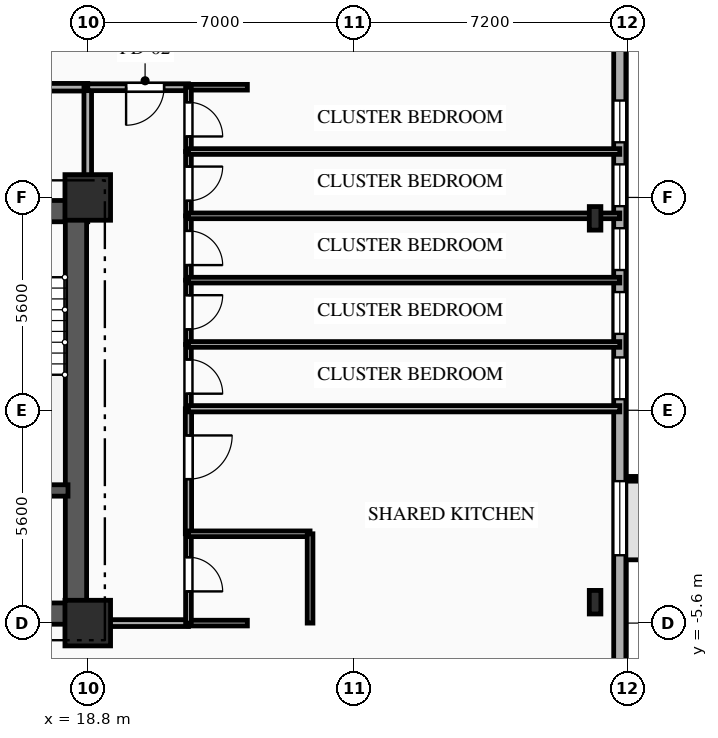
"""IFC4 building model, lengths in metres.
Left out: names, types, materials, properties, quantities, classifications, styles, units other than length and angle.
Written with IfcOpenShell. Run it as: python <this file> out.ifc"""

import sys

from ifc_helpers import new_model, si_unit, direction, frame, frame_2d, origin, origin_2d, place, context, subcontext, project, spatial, rectangle, i_section, extrude, element, fill, save


model = new_model("IFC4")
c1 = context("Model", 3, precision=1e-05, world=origin(), true_north=direction((0.0, 1.0)))
c2 = subcontext(c1, "Body", "Model", "MODEL_VIEW")
j1 = project(units=[si_unit("LENGTHUNIT", "METRE"), si_unit("PLANEANGLEUNIT", "RADIAN")], contexts=[c1])
p1 = place(None, origin())
s1 = spatial("IfcSite", under=j1, at=p1, CompositionType="ELEMENT")
p2 = place(p1, origin())
s2 = spatial("IfcBuilding", under=s1, at=p2, CompositionType="ELEMENT")
p3 = place(p2, frame((0.0, 0.0, 47.1)))
s3 = spatial("IfcBuildingStorey", under=s2, at=p3, CompositionType="ELEMENT", Elevation=47.1)
for number, where, z_axis, x_axis in (
    (1, (18.8, -5.6, 0.0), (0.0, 0.0, 1.0), (1.0, 0.0, 0.0)),
    (2, (18.8, 5.6, 0.0), (0.0, 0.0, 1.0), (1.0, 0.0, 0.0)),
):
    element("IfcColumn", number, at=place(p3, frame(where, z_axis=z_axis, x_axis=x_axis)), inside=s3, PredefinedType="COLUMN", context=c2, shape_type="SweptSolid", body=[
        extrude(rectangle(XDim=1.2, YDim=1.2, at=origin_2d()), origin(), (0.0, 0.0, 1.0), 3.35),
    ])
for number, where, z_axis, x_axis in (
    (3, (32.15, -5.05, 0.0), (0.0, 0.0, 1.0), (1.0, 0.0, 0.0)),
    (4, (32.15, 5.05, 0.0), (0.0, 0.0, 1.0), (1.0, 0.0, 0.0)),
):
    element("IfcColumn", number, at=place(p3, frame(where, z_axis=z_axis, x_axis=x_axis)), inside=s3, PredefinedType="COLUMN", context=c2, shape_type="SweptSolid", body=[
        extrude(i_section(OverallWidth=0.305, OverallDepth=0.62, WebThickness=0.021, FlangeThickness=0.04, FilletRadius=0.027, at=origin_2d()), origin(), (0.0, 0.0, 1.0), 3.35),
    ])
p4 = place(p3, frame((32.8, 15.8, 0.0), z_axis=(0.0, 0.0, 1.0), x_axis=(0.0, -1.0, 0.0)))
e5 = element("IfcWall", 5, at=p4, inside=s3, PredefinedType="SOLIDWALL", context=c2, shape_type="SweptSolid", body=[
    extrude(rectangle(XDim=31.6, YDim=0.32, at=frame_2d((15.8, 0.0))), origin(), (0.0, 0.0, 1.0), 3.035),
])
p5 = place(p4, frame((7.65, 0.0, 0.85)))
e6 = element("IfcOpeningElement", 6, at=p5, cuts=e5, PredefinedType="OPENING", context=c2, shape_type="SweptSolid", body=[
    extrude(rectangle(XDim=1.1, YDim=1.85, at=frame_2d((0.55, 0.925))), frame((0.0, 0.17, 0.0), z_axis=(0.0, -1.0, 0.0), x_axis=(1.0, 0.0, 0.0)), (0.0, 0.0, 1.0), 0.34),
])
p6 = place(p4, frame((9.33, 0.0, 0.85)))
e7 = element("IfcOpeningElement", 7, at=p6, cuts=e5, PredefinedType="OPENING", context=c2, shape_type="SweptSolid", body=[
    extrude(rectangle(XDim=1.1, YDim=1.85, at=frame_2d((0.55, 0.925))), frame((0.0, 0.17, 0.0), z_axis=(0.0, -1.0, 0.0), x_axis=(1.0, 0.0, 0.0)), (0.0, 0.0, 1.0), 0.34),
])
p7 = place(p4, frame((11.01, 0.0, 0.85)))
e8 = element("IfcOpeningElement", 8, at=p7, cuts=e5, PredefinedType="OPENING", context=c2, shape_type="SweptSolid", body=[
    extrude(rectangle(XDim=1.1, YDim=1.85, at=frame_2d((0.55, 0.925))), frame((0.0, 0.17, 0.0), z_axis=(0.0, -1.0, 0.0), x_axis=(1.0, 0.0, 0.0)), (0.0, 0.0, 1.0), 0.34),
])
p8 = place(p4, frame((12.69, 0.0, 0.85)))
e9 = element("IfcOpeningElement", 9, at=p8, cuts=e5, PredefinedType="OPENING", context=c2, shape_type="SweptSolid", body=[
    extrude(rectangle(XDim=1.1, YDim=1.85, at=frame_2d((0.55, 0.925))), frame((0.0, 0.17, 0.0), z_axis=(0.0, -1.0, 0.0), x_axis=(1.0, 0.0, 0.0)), (0.0, 0.0, 1.0), 0.34),
])
p9 = place(p4, frame((14.41, 0.0, 0.85)))
e10 = element("IfcOpeningElement", 10, at=p9, cuts=e5, PredefinedType="OPENING", context=c2, shape_type="SweptSolid", body=[
    extrude(rectangle(XDim=1.1, YDim=1.85, at=frame_2d((0.55, 0.925))), frame((0.0, 0.17, 0.0), z_axis=(0.0, -1.0, 0.0), x_axis=(1.0, 0.0, 0.0)), (0.0, 0.0, 1.0), 0.34),
])
p10 = place(p4, frame((17.665, 0.0, 0.85)))
e11 = element("IfcOpeningElement", 11, at=p10, cuts=e5, PredefinedType="OPENING", context=c2, shape_type="SweptSolid", body=[
    extrude(rectangle(XDim=1.95, YDim=1.85, at=frame_2d((0.975, 0.925))), frame((0.0, 0.17, 0.0), z_axis=(0.0, -1.0, 0.0), x_axis=(1.0, 0.0, 0.0)), (0.0, 0.0, 1.0), 0.34),
])
p11 = place(p3, frame((9.2, 5.24, 0.0), z_axis=(0.0, 0.0, 1.0), x_axis=(1.0, 0.0, 0.0)))
e12 = element("IfcWall", 12, at=p11, inside=s3, PredefinedType="SHEAR", context=c2, shape_type="SweptSolid", body=[
    extrude(rectangle(XDim=9.6, YDim=0.56, at=frame_2d((4.8, 0.0))), origin(), (0.0, 0.0, 1.0), 3.035),
])
p12 = place(p11, frame((6.95, 0.0, 0.0)))
e13 = element("IfcOpeningElement", 13, at=p12, cuts=e12, PredefinedType="OPENING", context=c2, shape_type="SweptSolid", body=[
    extrude(rectangle(XDim=1.1, YDim=2.15, at=frame_2d((0.55, 1.075))), frame((0.0, 0.29, 0.0), z_axis=(0.0, -1.0, 0.0), x_axis=(1.0, 0.0, 0.0)), (0.0, 0.0, 1.0), 0.58),
])
p13 = place(p11, frame((3.775, 0.0, 0.0)))
e14 = element("IfcOpeningElement", 14, at=p13, cuts=e12, PredefinedType="OPENING", context=c2, shape_type="SweptSolid", body=[
    extrude(rectangle(XDim=1.05, YDim=2.1, at=frame_2d((0.525, 1.05))), frame((0.0, 0.29, 0.0), z_axis=(0.0, -1.0, 0.0), x_axis=(1.0, 0.0, 0.0)), (0.0, 0.0, 1.0), 0.58),
])
p14 = place(p3, frame((9.2, -5.35, 0.0), z_axis=(0.0, 0.0, 1.0), x_axis=(1.0, 0.0, 0.0)))
e15 = element("IfcWall", 15, at=p14, inside=s3, PredefinedType="SHEAR", context=c2, shape_type="SweptSolid", body=[
    extrude(rectangle(XDim=9.6, YDim=0.56, at=frame_2d((4.8, 0.0))), origin(), (0.0, 0.0, 1.0), 3.035),
])
p15 = place(p14, frame((7.65, 0.0, 0.0)))
e16 = element("IfcOpeningElement", 16, at=p15, cuts=e15, PredefinedType="OPENING", context=c2, shape_type="SweptSolid", body=[
    extrude(rectangle(XDim=0.9, YDim=2.1, at=frame_2d((0.45, 1.05))), frame((0.0, 0.29, 0.0), z_axis=(0.0, -1.0, 0.0), x_axis=(1.0, 0.0, 0.0)), (0.0, 0.0, 1.0), 0.58),
])
p16 = place(p3, frame((18.49, -5.05, 0.0), z_axis=(0.0, 0.0, 1.0), x_axis=(0.0, 1.0, 0.0)))
e17 = element("IfcWall", 17, at=p16, inside=s3, PredefinedType="SHEAR", context=c2, shape_type="SweptSolid", body=[
    extrude(rectangle(XDim=10.1, YDim=0.56, at=frame_2d((5.05, 0.0))), origin(), (0.0, 0.0, 1.0), 3.035),
])
p17 = place(p3, frame((15.1, -2.11, 0.0), z_axis=(0.0, 0.0, 1.0), x_axis=(1.0, 0.0, 0.0)))
e18 = element("IfcWall", 18, at=p17, inside=s3, PredefinedType="SHEAR", context=c2, shape_type="SweptSolid", body=[
    extrude(rectangle(XDim=3.18, YDim=0.3, at=frame_2d((1.59, 0.0))), origin(), (0.0, 0.0, 1.0), 3.035),
])
p18 = place(p3, frame((18.8, 8.5, 0.0), z_axis=(0.0, 0.0, 1.0), x_axis=(-1.0, 0.0, 0.0)))
e19 = element("IfcWall", 19, at=p18, inside=s3, PredefinedType="PARTITIONING", context=c2, shape_type="SweptSolid", body=[
    extrude(rectangle(XDim=6.8, YDim=0.2, at=frame_2d((3.4, 0.0))), origin(), (0.0, 0.0, 1.0), 3.035),
])
p19 = place(p18, frame((3.985, 0.0, 0.0)))
e20 = element("IfcOpeningElement", 20, at=p19, cuts=e19, PredefinedType="OPENING", context=c2, shape_type="SweptSolid", body=[
    extrude(rectangle(XDim=1.1, YDim=2.15, at=frame_2d((0.55, 1.075))), frame((0.0, 0.11, 0.0), z_axis=(0.0, -1.0, 0.0), x_axis=(1.0, 0.0, 0.0)), (0.0, 0.0, 1.0), 0.22),
])
p20 = place(p3, frame((18.8, 5.6, 0.0), z_axis=(0.0, 0.0, 1.0), x_axis=(0.0, 1.0, 0.0)))
e21 = element("IfcWall", 21, at=p20, inside=s3, PredefinedType="PARTITIONING", context=c2, shape_type="SweptSolid", body=[
    extrude(rectangle(XDim=2.9, YDim=0.2, at=frame_2d((1.45, 0.0))), origin(), (0.0, 0.0, 1.0), 2.52),
])
p21 = place(p3, frame((21.45, 8.5, 0.0), z_axis=(0.0, 0.0, 1.0), x_axis=(-1.0, 0.0, 0.0)))
e22 = element("IfcWall", 22, at=p21, inside=s3, PredefinedType="PARTITIONING", context=c2, shape_type="SweptSolid", body=[
    extrude(rectangle(XDim=2.65, YDim=0.18, at=frame_2d((1.325, 0.0))), origin(), (0.0, 0.0, 1.0), 3.035),
])
p22 = place(p21, frame((0.641, 0.0, 0.0)))
e23 = element("IfcOpeningElement", 23, at=p22, cuts=e22, PredefinedType="OPENING", context=c2, shape_type="SweptSolid", body=[
    extrude(rectangle(XDim=1.0, YDim=2.15, at=frame_2d((0.5, 1.075))), frame((0.0, 0.1, 0.0), z_axis=(0.0, -1.0, 0.0), x_axis=(1.0, 0.0, 0.0)), (0.0, 0.0, 1.0), 0.2),
])
p23 = place(p3, frame((23.0, 8.5, 0.0), z_axis=(0.0, 0.0, 1.0), x_axis=(-1.0, 0.0, 0.0)))
e24 = element("IfcWall", 24, at=p23, inside=s3, PredefinedType="PARTITIONING", context=c2, shape_type="SweptSolid", body=[
    extrude(rectangle(XDim=1.55, YDim=0.15, at=frame_2d((0.775, 0.0))), origin(), (0.0, 0.0, 1.0), 3.035),
])
p24 = place(p3, frame((18.8, -5.6, 0.0), z_axis=(0.0, 0.0, 1.0), x_axis=(1.0, 0.0, 0.0)))
e25 = element("IfcWall", 25, at=p24, inside=s3, PredefinedType="PARTITIONING", context=c2, shape_type="SweptSolid", body=[
    extrude(rectangle(XDim=2.65, YDim=0.18, at=frame_2d((1.325, 0.0))), origin(), (0.0, 0.0, 1.0), 3.035),
])
p25 = place(p3, frame((21.45, -5.6, 0.0), z_axis=(0.0, 0.0, 1.0), x_axis=(1.0, 0.0, 0.0)))
e26 = element("IfcWall", 26, at=p25, inside=s3, PredefinedType="PLUMBINGWALL", context=c2, shape_type="SweptSolid", body=[
    extrude(rectangle(XDim=1.55, YDim=0.15, at=frame_2d((0.775, 0.0))), origin(), (0.0, 0.0, 1.0), 3.035),
])
p26 = place(p3, frame((21.45, -3.25, 0.0), z_axis=(0.0, 0.0, 1.0), x_axis=(0.0, -1.0, 0.0)))
e27 = element("IfcWall", 27, at=p26, inside=s3, PredefinedType="PLUMBINGWALL", context=c2, shape_type="SweptSolid", body=[
    extrude(rectangle(XDim=2.35, YDim=0.15, at=frame_2d((1.175, 0.0))), origin(), (0.0, 0.0, 1.0), 3.035),
])
p27 = place(p26, frame((0.616, 0.0, 0.0)))
e28 = element("IfcOpeningElement", 28, at=p27, cuts=e27, PredefinedType="OPENING", context=c2, shape_type="SweptSolid", body=[
    extrude(rectangle(XDim=0.9, YDim=2.1, at=frame_2d((0.45, 1.05))), frame((0.0, 0.085, 0.0), z_axis=(0.0, -1.0, 0.0), x_axis=(1.0, 0.0, 0.0)), (0.0, 0.0, 1.0), 0.17),
])
p28 = place(p3, frame((21.45, 0.04, 0.0), z_axis=(0.0, 0.0, 1.0), x_axis=(0.0, -1.0, 0.0)))
e29 = element("IfcWall", 29, at=p28, inside=s3, PredefinedType="PARTITIONING", context=c2, shape_type="SweptSolid", body=[
    extrude(rectangle(XDim=3.29, YDim=0.165, at=frame_2d((1.645, 0.0))), origin(), (0.0, 0.0, 1.0), 3.035),
])
p29 = place(p28, frame((0.702, 0.0, 0.0)))
e30 = element("IfcOpeningElement", 30, at=p29, cuts=e29, PredefinedType="OPENING", context=c2, shape_type="SweptSolid", body=[
    extrude(rectangle(XDim=1.15, YDim=2.15, at=frame_2d((0.575, 1.075))), frame((0.0, 0.093, 0.0), z_axis=(0.0, -1.0, 0.0), x_axis=(1.0, 0.0, 0.0)), (0.0, 0.0, 1.0), 0.185),
])
p30 = place(p3, frame((21.45, 1.732, 0.0), z_axis=(0.0, 0.0, 1.0), x_axis=(0.0, -1.0, 0.0)))
e31 = element("IfcWall", 31, at=p30, inside=s3, PredefinedType="PARTITIONING", context=c2, shape_type="SweptSolid", body=[
    extrude(rectangle(XDim=1.692, YDim=0.15, at=frame_2d((0.846, 0.0))), origin(), (0.0, 0.0, 1.0), 3.035),
])
p31 = place(p30, frame((0.396, 0.0, 0.0)))
e32 = element("IfcOpeningElement", 32, at=p31, cuts=e31, PredefinedType="OPENING", context=c2, shape_type="SweptSolid", body=[
    extrude(rectangle(XDim=0.9, YDim=2.1, at=frame_2d((0.45, 1.05))), frame((0.0, 0.085, 0.0), z_axis=(0.0, -1.0, 0.0), x_axis=(1.0, 0.0, 0.0)), (0.0, 0.0, 1.0), 0.17),
])
p32 = place(p3, frame((21.45, 3.424, 0.0), z_axis=(0.0, 0.0, 1.0), x_axis=(0.0, -1.0, 0.0)))
e33 = element("IfcWall", 33, at=p32, inside=s3, PredefinedType="PARTITIONING", context=c2, shape_type="SweptSolid", body=[
    extrude(rectangle(XDim=1.692, YDim=0.15, at=frame_2d((0.846, 0.0))), origin(), (0.0, 0.0, 1.0), 3.035),
])
p33 = place(p32, frame((0.396, 0.0, 0.0)))
e34 = element("IfcOpeningElement", 34, at=p33, cuts=e33, PredefinedType="OPENING", context=c2, shape_type="SweptSolid", body=[
    extrude(rectangle(XDim=0.9, YDim=2.1, at=frame_2d((0.45, 1.05))), frame((0.0, 0.085, 0.0), z_axis=(0.0, -1.0, 0.0), x_axis=(1.0, 0.0, 0.0)), (0.0, 0.0, 1.0), 0.17),
])
p34 = place(p3, frame((21.45, 5.116, 0.0), z_axis=(0.0, 0.0, 1.0), x_axis=(0.0, -1.0, 0.0)))
e35 = element("IfcWall", 35, at=p34, inside=s3, PredefinedType="PARTITIONING", context=c2, shape_type="SweptSolid", body=[
    extrude(rectangle(XDim=1.692, YDim=0.15, at=frame_2d((0.846, 0.0))), origin(), (0.0, 0.0, 1.0), 3.035),
])
p35 = place(p34, frame((0.396, 0.0, 0.0)))
e36 = element("IfcOpeningElement", 36, at=p35, cuts=e35, PredefinedType="OPENING", context=c2, shape_type="SweptSolid", body=[
    extrude(rectangle(XDim=0.9, YDim=2.1, at=frame_2d((0.45, 1.05))), frame((0.0, 0.085, 0.0), z_axis=(0.0, -1.0, 0.0), x_axis=(1.0, 0.0, 0.0)), (0.0, 0.0, 1.0), 0.17),
])
p36 = place(p3, frame((21.45, 6.808, 0.0), z_axis=(0.0, 0.0, 1.0), x_axis=(0.0, -1.0, 0.0)))
e37 = element("IfcWall", 37, at=p36, inside=s3, PredefinedType="PARTITIONING", context=c2, shape_type="SweptSolid", body=[
    extrude(rectangle(XDim=1.692, YDim=0.15, at=frame_2d((0.846, 0.0))), origin(), (0.0, 0.0, 1.0), 3.035),
])
p37 = place(p36, frame((0.396, 0.0, 0.0)))
e38 = element("IfcOpeningElement", 38, at=p37, cuts=e37, PredefinedType="OPENING", context=c2, shape_type="SweptSolid", body=[
    extrude(rectangle(XDim=0.9, YDim=2.1, at=frame_2d((0.45, 1.05))), frame((0.0, 0.085, 0.0), z_axis=(0.0, -1.0, 0.0), x_axis=(1.0, 0.0, 0.0)), (0.0, 0.0, 1.0), 0.17),
])
p38 = place(p3, frame((21.45, 8.5, 0.0), z_axis=(0.0, 0.0, 1.0), x_axis=(0.0, -1.0, 0.0)))
e39 = element("IfcWall", 39, at=p38, inside=s3, PredefinedType="PARTITIONING", context=c2, shape_type="SweptSolid", body=[
    extrude(rectangle(XDim=1.692, YDim=0.15, at=frame_2d((0.846, 0.0))), origin(), (0.0, 0.0, 1.0), 3.035),
])
p39 = place(p38, frame((0.396, 0.0, 0.0)))
e40 = element("IfcOpeningElement", 40, at=p39, cuts=e39, PredefinedType="OPENING", context=c2, shape_type="SweptSolid", body=[
    extrude(rectangle(XDim=0.9, YDim=2.1, at=frame_2d((0.45, 1.05))), frame((0.0, 0.085, 0.0), z_axis=(0.0, -1.0, 0.0), x_axis=(1.0, 0.0, 0.0)), (0.0, 0.0, 1.0), 0.17),
])
p40 = place(p3, frame((21.45, -3.25, 0.0), z_axis=(0.0, 0.0, 1.0), x_axis=(1.0, 0.0, 0.0)))
e41 = element("IfcWall", 41, at=p40, inside=s3, PredefinedType="PLUMBINGWALL", context=c2, shape_type="SweptSolid", body=[
    extrude(rectangle(XDim=3.2, YDim=0.15, at=frame_2d((1.6, 0.0))), origin(), (0.0, 0.0, 1.0), 2.52),
])
p41 = place(p3, frame((24.65, -3.25, 0.0), z_axis=(0.0, 0.0, 1.0), x_axis=(0.0, -1.0, 0.0)))
e42 = element("IfcWall", 42, at=p41, inside=s3, PredefinedType="PLUMBINGWALL", context=c2, shape_type="SweptSolid", body=[
    extrude(rectangle(XDim=2.35, YDim=0.15, at=frame_2d((1.175, 0.0))), origin(), (0.0, 0.0, 1.0), 3.035),
])
p42 = place(p3, frame((21.45, 0.04, 0.0), z_axis=(0.0, 0.0, 1.0), x_axis=(1.0, 0.0, 0.0)))
e43 = element("IfcWall", 43, at=p42, inside=s3, PredefinedType="PARTITIONING", context=c2, shape_type="SweptSolid", body=[
    extrude(rectangle(XDim=11.35, YDim=0.165, at=frame_2d((5.675, 0.0))), origin(), (0.0, 0.0, 1.0), 3.035),
])
p43 = place(p3, frame((21.45, 1.732, 0.0), z_axis=(0.0, 0.0, 1.0), x_axis=(1.0, 0.0, 0.0)))
e44 = element("IfcWall", 44, at=p43, inside=s3, PredefinedType="PARTITIONING", context=c2, shape_type="SweptSolid", body=[
    extrude(rectangle(XDim=11.35, YDim=0.15, at=frame_2d((5.675, 0.0))), origin(), (0.0, 0.0, 1.0), 3.035),
])
for number, where, z_axis, x_axis in (
    (45, (21.45, 3.424, 0.0), (0.0, 0.0, 1.0), (1.0, 0.0, 0.0)),
    (46, (21.45, 5.116, 0.0), (0.0, 0.0, 1.0), (1.0, 0.0, 0.0)),
):
    element("IfcWall", number, at=place(p3, frame(where, z_axis=z_axis, x_axis=x_axis)), inside=s3, PredefinedType="PARTITIONING", context=c2, shape_type="SweptSolid", body=[
        extrude(rectangle(XDim=11.35, YDim=0.15, at=frame_2d((5.675, 0.0))), origin(), (0.0, 0.0, 1.0), 2.52),
    ])
p44 = place(p3, frame((21.45, 6.808, 0.0), z_axis=(0.0, 0.0, 1.0), x_axis=(1.0, 0.0, 0.0)))
e47 = element("IfcWall", 47, at=p44, inside=s3, PredefinedType="PARTITIONING", context=c2, shape_type="SweptSolid", body=[
    extrude(rectangle(XDim=11.35, YDim=0.15, at=frame_2d((5.675, 0.0))), origin(), (0.0, 0.0, 1.0), 3.035),
])
p45 = place(p5, origin())
e48 = element("IfcWindow", 48, at=p45, inside=s3, PartitioningType="SINGLE_PANEL", PredefinedType="WINDOW", context=c2, shape_type="SweptSolid", body=[
    extrude(rectangle(XDim=1.1, YDim=1.85, at=frame_2d((0.55, 0.925))), frame((0.0, 0.03, 0.0), z_axis=(0.0, -1.0, 0.0), x_axis=(1.0, 0.0, 0.0)), (0.0, 0.0, 1.0), 0.06),
])
fill(e6, e48)
p46 = place(p6, origin())
e49 = element("IfcWindow", 49, at=p46, inside=s3, PartitioningType="SINGLE_PANEL", PredefinedType="WINDOW", context=c2, shape_type="SweptSolid", body=[
    extrude(rectangle(XDim=1.1, YDim=1.85, at=frame_2d((0.55, 0.925))), frame((0.0, 0.03, 0.0), z_axis=(0.0, -1.0, 0.0), x_axis=(1.0, 0.0, 0.0)), (0.0, 0.0, 1.0), 0.06),
])
fill(e7, e49)
p47 = place(p7, origin())
e50 = element("IfcWindow", 50, at=p47, inside=s3, PartitioningType="SINGLE_PANEL", PredefinedType="WINDOW", context=c2, shape_type="SweptSolid", body=[
    extrude(rectangle(XDim=1.1, YDim=1.85, at=frame_2d((0.55, 0.925))), frame((0.0, 0.03, 0.0), z_axis=(0.0, -1.0, 0.0), x_axis=(1.0, 0.0, 0.0)), (0.0, 0.0, 1.0), 0.06),
])
fill(e8, e50)
p48 = place(p8, origin())
e51 = element("IfcWindow", 51, at=p48, inside=s3, PartitioningType="SINGLE_PANEL", PredefinedType="WINDOW", context=c2, shape_type="SweptSolid", body=[
    extrude(rectangle(XDim=1.1, YDim=1.85, at=frame_2d((0.55, 0.925))), frame((0.0, 0.03, 0.0), z_axis=(0.0, -1.0, 0.0), x_axis=(1.0, 0.0, 0.0)), (0.0, 0.0, 1.0), 0.06),
])
fill(e9, e51)
p49 = place(p9, origin())
e52 = element("IfcWindow", 52, at=p49, inside=s3, PartitioningType="SINGLE_PANEL", PredefinedType="WINDOW", context=c2, shape_type="SweptSolid", body=[
    extrude(rectangle(XDim=1.1, YDim=1.85, at=frame_2d((0.55, 0.925))), frame((0.0, 0.03, 0.0), z_axis=(0.0, -1.0, 0.0), x_axis=(1.0, 0.0, 0.0)), (0.0, 0.0, 1.0), 0.06),
])
fill(e10, e52)
p50 = place(p10, origin())
e53 = element("IfcWindow", 53, at=p50, inside=s3, PartitioningType="SINGLE_PANEL", PredefinedType="WINDOW", context=c2, shape_type="SweptSolid", body=[
    extrude(rectangle(XDim=1.95, YDim=1.85, at=frame_2d((0.975, 0.925))), frame((0.0, 0.03, 0.0), z_axis=(0.0, -1.0, 0.0), x_axis=(1.0, 0.0, 0.0)), (0.0, 0.0, 1.0), 0.06),
])
fill(e11, e53)
p51 = place(p22, origin())
e54 = element("IfcDoor", 54, at=p51, inside=s3, OperationType="SINGLE_SWING_RIGHT", PredefinedType="DOOR", context=c2, shape_type="SweptSolid", body=[
    extrude(rectangle(XDim=1.0, YDim=2.15, at=frame_2d((0.5, 1.075))), frame((0.0, 0.025, 0.0), z_axis=(0.0, -1.0, 0.0), x_axis=(1.0, 0.0, 0.0)), (0.0, 0.0, 1.0), 0.05),
])
fill(e23, e54)
p52 = place(p27, origin())
e55 = element("IfcDoor", 55, at=p52, inside=s3, OperationType="SINGLE_SWING_RIGHT", PredefinedType="DOOR", context=c2, shape_type="SweptSolid", body=[
    extrude(rectangle(XDim=0.9, YDim=2.1, at=frame_2d((0.45, 1.05))), frame((0.0, 0.025, 0.0), z_axis=(0.0, -1.0, 0.0), x_axis=(1.0, 0.0, 0.0)), (0.0, 0.0, 1.0), 0.05),
])
fill(e28, e55)
p53 = place(p29, origin())
e56 = element("IfcDoor", 56, at=p53, inside=s3, OperationType="SINGLE_SWING_LEFT", PredefinedType="DOOR", context=c2, shape_type="SweptSolid", body=[
    extrude(rectangle(XDim=1.15, YDim=2.15, at=frame_2d((0.575, 1.075))), frame((0.0, 0.025, 0.0), z_axis=(0.0, -1.0, 0.0), x_axis=(1.0, 0.0, 0.0)), (0.0, 0.0, 1.0), 0.05),
])
fill(e30, e56)
p54 = place(p31, origin())
e57 = element("IfcDoor", 57, at=p54, inside=s3, OperationType="SINGLE_SWING_RIGHT", PredefinedType="DOOR", context=c2, shape_type="SweptSolid", body=[
    extrude(rectangle(XDim=0.9, YDim=2.1, at=frame_2d((0.45, 1.05))), frame((0.0, 0.025, 0.0), z_axis=(0.0, -1.0, 0.0), x_axis=(1.0, 0.0, 0.0)), (0.0, 0.0, 1.0), 0.05),
])
fill(e32, e57)
p55 = place(p33, origin())
e58 = element("IfcDoor", 58, at=p55, inside=s3, OperationType="SINGLE_SWING_LEFT", PredefinedType="DOOR", context=c2, shape_type="SweptSolid", body=[
    extrude(rectangle(XDim=0.9, YDim=2.1, at=frame_2d((0.45, 1.05))), frame((0.0, 0.025, 0.0), z_axis=(0.0, -1.0, 0.0), x_axis=(1.0, 0.0, 0.0)), (0.0, 0.0, 1.0), 0.05),
])
fill(e34, e58)
p56 = place(p35, origin())
e59 = element("IfcDoor", 59, at=p56, inside=s3, OperationType="SINGLE_SWING_RIGHT", PredefinedType="DOOR", context=c2, shape_type="SweptSolid", body=[
    extrude(rectangle(XDim=0.9, YDim=2.1, at=frame_2d((0.45, 1.05))), frame((0.0, 0.025, 0.0), z_axis=(0.0, -1.0, 0.0), x_axis=(1.0, 0.0, 0.0)), (0.0, 0.0, 1.0), 0.05),
])
fill(e36, e59)
p57 = place(p37, origin())
e60 = element("IfcDoor", 60, at=p57, inside=s3, OperationType="SINGLE_SWING_LEFT", PredefinedType="DOOR", context=c2, shape_type="SweptSolid", body=[
    extrude(rectangle(XDim=0.9, YDim=2.1, at=frame_2d((0.45, 1.05))), frame((0.0, 0.025, 0.0), z_axis=(0.0, -1.0, 0.0), x_axis=(1.0, 0.0, 0.0)), (0.0, 0.0, 1.0), 0.05),
])
fill(e38, e60)
p58 = place(p39, origin())
e61 = element("IfcDoor", 61, at=p58, inside=s3, OperationType="SINGLE_SWING_RIGHT", PredefinedType="DOOR", context=c2, shape_type="SweptSolid", body=[
    extrude(rectangle(XDim=0.9, YDim=2.1, at=frame_2d((0.45, 1.05))), frame((0.0, 0.025, 0.0), z_axis=(0.0, -1.0, 0.0), x_axis=(1.0, 0.0, 0.0)), (0.0, 0.0, 1.0), 0.05),
])
fill(e40, e61)
save(model, sys.argv[1])
